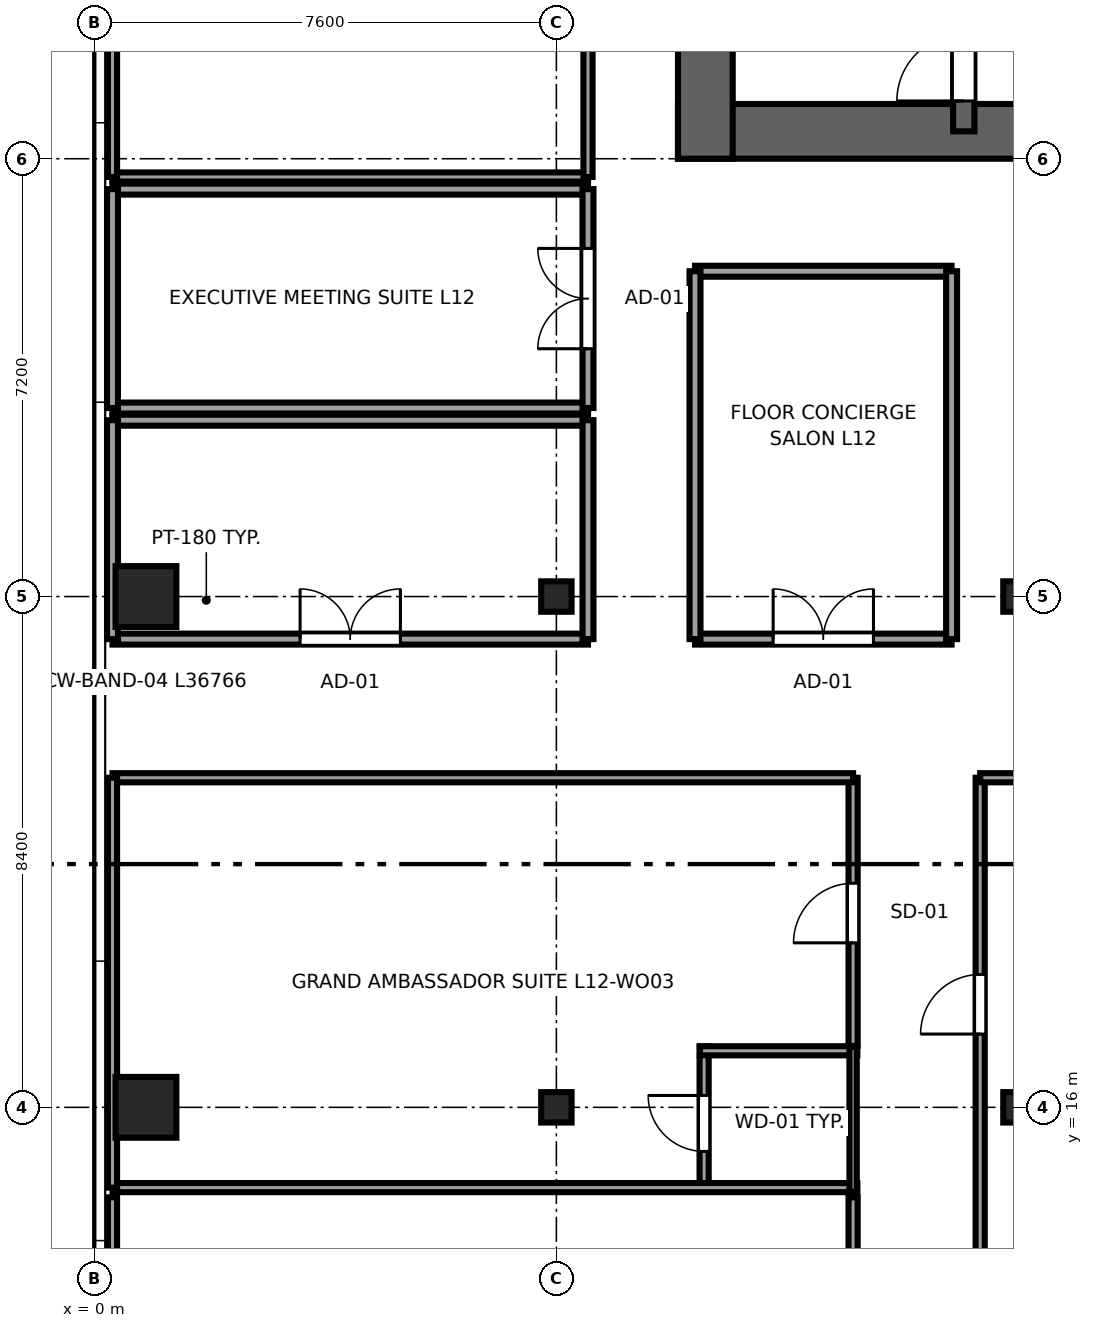
"""IFC4 building model, lengths in metres.
Left out: names, types, materials, properties, quantities, classifications, styles, units other than length and angle.
Written with IfcOpenShell. Run it as: python <this file> out.ifc"""

import sys

from ifc_helpers import new_model, si_unit, direction, frame, frame_2d, origin, origin_2d, place, context, subcontext, project, spatial, rectangle, i_section, extrude, source, transform, mapped, element, fill, save


model = new_model("IFC4")
c1 = context("Model", 3, precision=1e-05, world=origin(), true_north=direction((0.0, 1.0)))
c2 = subcontext(c1, "Body", "Model", "MODEL_VIEW")
j1 = project(units=[si_unit("LENGTHUNIT", "METRE"), si_unit("PLANEANGLEUNIT", "RADIAN")], contexts=[c1])
p1 = place(None, origin())
s1 = spatial("IfcSite", under=j1, at=p1, CompositionType="ELEMENT")
p2 = place(p1, origin())
s2 = spatial("IfcBuilding", under=s1, at=p2, CompositionType="ELEMENT")
p3 = place(p2, frame((0.0, 0.0, 53.3)))
s3 = spatial("IfcBuildingStorey", under=s2, at=p3, CompositionType="ELEMENT", Elevation=53.3)
p4 = place(p3, frame((9.6, 32.05, 0.0), z_axis=(0.0, 0.0, 1.0), x_axis=(1.0, 0.0, 0.0)))
e1 = element("IfcWall", 1, at=p4, inside=s3, PredefinedType="SHEAR", context=c2, shape_type="SweptSolid", body=[
    extrude(rectangle(XDim=26.8, YDim=0.9, at=frame_2d((13.4, 0.0))), origin(), (0.0, 0.0, 1.0), 3.55),
])
p5 = place(p4, frame((7.85, 0.0, 0.0), z_axis=(0.0, 0.0, 1.0), x_axis=(-1.0, 0.0, 0.0)))
e2 = element("IfcOpeningElement", 2, at=p5, cuts=e1, PredefinedType="OPENING", context=c2, shape_type="SweptSolid", body=[
    extrude(rectangle(XDim=1.5, YDim=2.04, at=frame_2d((0.75, 1.02))), frame((0.0, 0.46, 0.0), z_axis=(0.0, -1.0, 0.0), x_axis=(1.0, 0.0, 0.0)), (0.0, 0.0, 1.0), 0.92),
])
p6 = place(p4, frame((14.15, 0.0, 0.0), z_axis=(0.0, 0.0, 1.0), x_axis=(-1.0, 0.0, 0.0)))
e3 = element("IfcOpeningElement", 3, at=p6, cuts=e1, PredefinedType="OPENING", context=c2, shape_type="SweptSolid", body=[
    extrude(rectangle(XDim=1.5, YDim=2.04, at=frame_2d((0.75, 1.02))), frame((0.0, 0.46, 0.0), z_axis=(0.0, -1.0, 0.0), x_axis=(1.0, 0.0, 0.0)), (0.0, 0.0, 1.0), 0.92),
])
p7 = place(p4, frame((20.45, 0.0, 0.0), z_axis=(0.0, 0.0, 1.0), x_axis=(-1.0, 0.0, 0.0)))
e4 = element("IfcOpeningElement", 4, at=p7, cuts=e1, PredefinedType="OPENING", context=c2, shape_type="SweptSolid", body=[
    extrude(rectangle(XDim=1.5, YDim=2.04, at=frame_2d((0.75, 1.02))), frame((0.0, 0.46, 0.0), z_axis=(0.0, -1.0, 0.0), x_axis=(1.0, 0.0, 0.0)), (0.0, 0.0, 1.0), 0.92),
])
p8 = place(p3, frame((10.05, 31.6, 0.0), z_axis=(0.0, 0.0, 1.0), x_axis=(0.0, 1.0, 0.0)))
e5 = element("IfcWall", 5, at=p8, inside=s3, PredefinedType="SHEAR", context=c2, shape_type="SweptSolid", body=[
    extrude(rectangle(XDim=13.6, YDim=0.9, at=frame_2d((6.8, 0.0))), origin(), (0.0, 0.0, 1.0), 3.55),
])
p9 = place(p3, frame((14.3, 32.05, 0.0), z_axis=(0.0, 0.0, 1.0), x_axis=(0.0, 1.0, 0.0)))
e6 = element("IfcWall", 6, at=p9, inside=s3, PredefinedType="SHEAR", context=c2, shape_type="SweptSolid", body=[
    extrude(rectangle(XDim=12.7, YDim=0.35, at=frame_2d((6.35, 0.0))), origin(), (0.0, 0.0, 1.0), 3.55),
])
p10 = place(p9, frame((0.5, 0.0, 0.0)))
e7 = element("IfcOpeningElement", 7, at=p10, cuts=e6, PredefinedType="OPENING", context=c2, shape_type="SweptSolid", body=[
    extrude(rectangle(XDim=1.1, YDim=2.12, at=frame_2d((0.55, 1.06))), frame((0.0, 0.185, 0.0), z_axis=(0.0, -1.0, 0.0), x_axis=(1.0, 0.0, 0.0)), (0.0, 0.0, 1.0), 0.37),
])
m1 = source(origin(), c2, "Body", "SweptSolid", [
    extrude(rectangle(XDim=1.0, YDim=1.0, at=origin_2d()), origin(), (0.0, 0.0, 1.0), 3.55),
])
for number, where, z_axis, x_axis in (
    (8, (0.85, 16.0, 0.0), (0.0, 0.0, 1.0), (1.0, 0.0, 0.0)),
    (9, (0.85, 24.4, 0.0), (0.0, 0.0, 1.0), (1.0, 0.0, 0.0)),
):
    element("IfcColumn", number, at=place(p3, frame(where, z_axis=z_axis, x_axis=x_axis)), inside=s3, PredefinedType="COLUMN", context=c2, shape_type="MappedRepresentation", body=[
        mapped(m1, transform((0.0, 0.0, 0.0), x_axis=(1.0, 0.0, 0.0), y_axis=(0.0, 1.0, 0.0), z_axis=(0.0, 0.0, 1.0), scale=1.0)),
    ])
m2 = source(origin(), c2, "Body", "SweptSolid", [
    extrude(i_section(OverallWidth=0.5, OverallDepth=0.5, WebThickness=0.028, FlangeThickness=0.045, at=origin_2d()), origin(), (0.0, 0.0, 1.0), 3.55),
])
for number, where, z_axis, x_axis in (
    (10, (7.6, 16.0, 0.0), (0.0, 0.0, 1.0), (1.0, 0.0, 0.0)),
    (11, (7.6, 24.4, 0.0), (0.0, 0.0, 1.0), (1.0, 0.0, 0.0)),
    (12, (15.2, 16.0, 0.0), (0.0, 0.0, 1.0), (1.0, 0.0, 0.0)),
    (13, (15.2, 24.4, 0.0), (0.0, 0.0, 1.0), (1.0, 0.0, 0.0)),
):
    element("IfcColumn", number, at=place(p3, frame(where, z_axis=z_axis, x_axis=x_axis)), inside=s3, PredefinedType="COLUMN", context=c2, shape_type="MappedRepresentation", body=[
        mapped(m2, transform((0.0, 0.0, 0.0), x_axis=(1.0, 0.0, 0.0), y_axis=(0.0, 1.0, 0.0), z_axis=(0.0, 0.0, 1.0), scale=1.0)),
    ])
p11 = place(p3, frame((10.03, 14.61, 0.0), z_axis=(0.0, 0.0, 1.0), x_axis=(0.0, 1.0, 0.0)))
e14 = element("IfcWall", 14, at=p11, inside=s3, PredefinedType="PARTITIONING", context=c2, shape_type="SweptSolid", body=[
    extrude(rectangle(XDim=2.39, YDim=0.15, at=frame_2d((1.195, 0.0))), origin(), (0.0, 0.0, 1.0), 3.37),
])
p12 = place(p11, frame((0.665, 0.0, 0.0)))
e15 = element("IfcOpeningElement", 15, at=p12, cuts=e14, PredefinedType="OPENING", context=c2, shape_type="SweptSolid", body=[
    extrude(rectangle(XDim=0.92, YDim=2.01, at=frame_2d((0.46, 1.005))), frame((0.0, 0.085, 0.0), z_axis=(0.0, -1.0, 0.0), x_axis=(1.0, 0.0, 0.0)), (0.0, 0.0, 1.0), 0.17),
])
p13 = place(p3, frame((0.3, 14.68, 0.0), z_axis=(0.0, 0.0, 1.0), x_axis=(1.0, 0.0, 0.0)))
e16 = element("IfcWall", 16, at=p13, inside=s3, PredefinedType="PARTITIONING", context=c2, shape_type="SweptSolid", body=[
    extrude(rectangle(XDim=12.25, YDim=0.15, at=frame_2d((6.125, 0.0))), origin(), (0.0, 0.0, 1.0), 3.37),
])
p14 = place(p3, frame((9.96, 16.93, 0.0), z_axis=(0.0, 0.0, 1.0), x_axis=(1.0, 0.0, 0.0)))
e17 = element("IfcWall", 17, at=p14, inside=s3, PredefinedType="PARTITIONING", context=c2, shape_type="SweptSolid", body=[
    extrude(rectangle(XDim=2.59, YDim=0.15, at=frame_2d((1.295, 0.0))), origin(), (0.0, 0.0, 1.0), 3.37),
])
p15 = place(p3, frame((12.48, 14.61, 0.0), z_axis=(0.0, 0.0, 1.0), x_axis=(0.0, 1.0, 0.0)))
e18 = element("IfcWall", 18, at=p15, inside=s3, PredefinedType="PLUMBINGWALL", context=c2, shape_type="SweptSolid", body=[
    extrude(rectangle(XDim=2.39, YDim=0.12, at=frame_2d((1.195, 0.0))), origin(), (0.0, 0.0, 1.0), 3.37),
])
p16 = place(p3, frame((12.48, 10.01, 0.0), z_axis=(0.0, 0.0, 1.0), x_axis=(0.0, 1.0, 0.0)))
e19 = element("IfcWall", 19, at=p16, inside=s3, PredefinedType="PARTITIONING", context=c2, shape_type="SweptSolid", body=[
    extrude(rectangle(XDim=4.51, YDim=0.15, at=frame_2d((2.255, 0.0))), origin(), (0.0, 0.0, 1.0), 3.37),
])
p17 = place(p16, frame((1.745, 0.0, 0.0)))
e20 = element("IfcOpeningElement", 20, at=p17, cuts=e19, PredefinedType="OPENING", context=c2, shape_type="SweptSolid", body=[
    extrude(rectangle(XDim=0.98, YDim=2.12, at=frame_2d((0.49, 1.06))), frame((0.0, 0.085, 0.0), z_axis=(0.0, -1.0, 0.0), x_axis=(1.0, 0.0, 0.0)), (0.0, 0.0, 1.0), 0.17),
])
p18 = place(p3, frame((0.3, 7.68, 0.0), z_axis=(0.0, 0.0, 1.0), x_axis=(0.0, 1.0, 0.0)))
e21 = element("IfcWall", 21, at=p18, inside=s3, PredefinedType="PARTITIONING", context=c2, shape_type="SweptSolid", body=[
    extrude(rectangle(XDim=6.84, YDim=0.15, at=frame_2d((3.42, 0.0))), origin(), (0.0, 0.0, 1.0), 3.37),
])
p19 = place(p3, frame((12.48, 17.01, 0.0), z_axis=(0.0, 0.0, 1.0), x_axis=(0.0, 1.0, 0.0)))
e22 = element("IfcWall", 22, at=p19, inside=s3, PredefinedType="PARTITIONING", context=c2, shape_type="SweptSolid", body=[
    extrude(rectangle(XDim=4.41, YDim=0.15, at=frame_2d((2.205, 0.0))), origin(), (0.0, 0.0, 1.0), 3.37),
])
p20 = place(p19, frame((1.695, 0.0, 0.0)))
e23 = element("IfcOpeningElement", 23, at=p20, cuts=e22, PredefinedType="OPENING", context=c2, shape_type="SweptSolid", body=[
    extrude(rectangle(XDim=0.98, YDim=2.12, at=frame_2d((0.49, 1.06))), frame((0.0, 0.085, 0.0), z_axis=(0.0, -1.0, 0.0), x_axis=(1.0, 0.0, 0.0)), (0.0, 0.0, 1.0), 0.17),
])
p21 = place(p3, frame((0.3, 21.42, 0.0), z_axis=(0.0, 0.0, 1.0), x_axis=(1.0, 0.0, 0.0)))
e24 = element("IfcWall", 24, at=p21, inside=s3, PredefinedType="PARTITIONING", context=c2, shape_type="SweptSolid", body=[
    extrude(rectangle(XDim=12.18, YDim=0.15, at=frame_2d((6.09, 0.0))), origin(), (0.0, 0.0, 1.0), 3.37),
])
p22 = place(p3, frame((0.3, 14.68, 0.0), z_axis=(0.0, 0.0, 1.0), x_axis=(0.0, 1.0, 0.0)))
e25 = element("IfcWall", 25, at=p22, inside=s3, PredefinedType="PARTITIONING", context=c2, shape_type="SweptSolid", body=[
    extrude(rectangle(XDim=6.74, YDim=0.15, at=frame_2d((3.37, 0.0))), origin(), (0.0, 0.0, 1.0), 3.37),
])
p23 = place(p3, frame((14.57, 13.41, 0.0), z_axis=(0.0, 0.0, 1.0), x_axis=(0.0, 1.0, 0.0)))
e26 = element("IfcWall", 26, at=p23, inside=s3, PredefinedType="PARTITIONING", context=c2, shape_type="SweptSolid", body=[
    extrude(rectangle(XDim=8.01, YDim=0.15, at=frame_2d((4.005, 0.0))), origin(), (0.0, 0.0, 1.0), 3.37),
])
p24 = place(p23, frame((3.795, 0.0, 0.0)))
e27 = element("IfcOpeningElement", 27, at=p24, cuts=e26, PredefinedType="OPENING", context=c2, shape_type="SweptSolid", body=[
    extrude(rectangle(XDim=0.98, YDim=2.12, at=frame_2d((0.49, 1.06))), frame((0.0, 0.085, 0.0), z_axis=(0.0, -1.0, 0.0), x_axis=(1.0, 0.0, 0.0)), (0.0, 0.0, 1.0), 0.17),
])
p25 = place(p3, frame((14.57, 21.42, 0.0), z_axis=(0.0, 0.0, 1.0), x_axis=(1.0, 0.0, 0.0)))
e28 = element("IfcWall", 28, at=p25, inside=s3, PredefinedType="PARTITIONING", context=c2, shape_type="SweptSolid", body=[
    extrude(rectangle(XDim=7.78, YDim=0.15, at=frame_2d((3.89, 0.0))), origin(), (0.0, 0.0, 1.0), 3.37),
])
p26 = place(p3, frame((0.3, 23.7, 0.0), z_axis=(0.0, 0.0, 1.0), x_axis=(1.0, 0.0, 0.0)))
e29 = element("IfcWall", 29, at=p26, inside=s3, PredefinedType="PARTITIONING", context=c2, shape_type="SweptSolid", body=[
    extrude(rectangle(XDim=7.82, YDim=0.18, at=frame_2d((3.91, 0.0))), origin(), (0.0, 0.0, 1.0), 3.37),
])
p27 = place(p26, frame((3.085, 0.0, 0.0)))
e30 = element("IfcOpeningElement", 30, at=p27, cuts=e29, PredefinedType="OPENING", context=c2, shape_type="SweptSolid", body=[
    extrude(rectangle(XDim=1.65, YDim=2.15, at=frame_2d((0.825, 1.075))), frame((0.0, 0.1, 0.0), z_axis=(0.0, -1.0, 0.0), x_axis=(1.0, 0.0, 0.0)), (0.0, 0.0, 1.0), 0.2),
])
p28 = place(p3, frame((0.3, 27.3, 0.0), z_axis=(0.0, 0.0, 1.0), x_axis=(1.0, 0.0, 0.0)))
e31 = element("IfcWall", 31, at=p28, inside=s3, PredefinedType="PARTITIONING", context=c2, shape_type="SweptSolid", body=[
    extrude(rectangle(XDim=7.82, YDim=0.18, at=frame_2d((3.91, 0.0))), origin(), (0.0, 0.0, 1.0), 3.37),
])
for number, where, z_axis, x_axis in (
    (32, (0.3, 23.7, 0.0), (0.0, 0.0, 1.0), (0.0, 1.0, 0.0)),
    (33, (8.12, 23.7, 0.0), (0.0, 0.0, 1.0), (0.0, 1.0, 0.0)),
):
    element("IfcWall", number, at=place(p3, frame(where, z_axis=z_axis, x_axis=x_axis)), inside=s3, PredefinedType="PARTITIONING", context=c2, shape_type="SweptSolid", body=[
        extrude(rectangle(XDim=3.6, YDim=0.18, at=frame_2d((1.8, 0.0))), origin(), (0.0, 0.0, 1.0), 3.37),
    ])
for number, where, z_axis, x_axis in (
    (34, (0.3, 27.5, 0.0), (0.0, 0.0, 1.0), (1.0, 0.0, 0.0)),
    (35, (0.3, 31.1, 0.0), (0.0, 0.0, 1.0), (1.0, 0.0, 0.0)),
):
    element("IfcWall", number, at=place(p3, frame(where, z_axis=z_axis, x_axis=x_axis)), inside=s3, PredefinedType="PARTITIONING", context=c2, shape_type="SweptSolid", body=[
        extrude(rectangle(XDim=7.82, YDim=0.18, at=frame_2d((3.91, 0.0))), origin(), (0.0, 0.0, 1.0), 3.37),
    ])
p29 = place(p3, frame((0.3, 27.5, 0.0), z_axis=(0.0, 0.0, 1.0), x_axis=(0.0, 1.0, 0.0)))
e36 = element("IfcWall", 36, at=p29, inside=s3, PredefinedType="PARTITIONING", context=c2, shape_type="SweptSolid", body=[
    extrude(rectangle(XDim=3.6, YDim=0.18, at=frame_2d((1.8, 0.0))), origin(), (0.0, 0.0, 1.0), 3.37),
])
p30 = place(p3, frame((8.12, 27.5, 0.0), z_axis=(0.0, 0.0, 1.0), x_axis=(0.0, 1.0, 0.0)))
e37 = element("IfcWall", 37, at=p30, inside=s3, PredefinedType="PARTITIONING", context=c2, shape_type="SweptSolid", body=[
    extrude(rectangle(XDim=3.6, YDim=0.18, at=frame_2d((1.8, 0.0))), origin(), (0.0, 0.0, 1.0), 3.37),
])
p31 = place(p30, frame((0.975, 0.0, 0.0)))
e38 = element("IfcOpeningElement", 38, at=p31, cuts=e37, PredefinedType="OPENING", context=c2, shape_type="SweptSolid", body=[
    extrude(rectangle(XDim=1.65, YDim=2.15, at=frame_2d((0.825, 1.075))), frame((0.0, 0.1, 0.0), z_axis=(0.0, -1.0, 0.0), x_axis=(1.0, 0.0, 0.0)), (0.0, 0.0, 1.0), 0.2),
])
p32 = place(p3, frame((0.3, 31.3, 0.0), z_axis=(0.0, 0.0, 1.0), x_axis=(1.0, 0.0, 0.0)))
e39 = element("IfcWall", 39, at=p32, inside=s3, PredefinedType="PARTITIONING", context=c2, shape_type="SweptSolid", body=[
    extrude(rectangle(XDim=7.82, YDim=0.15, at=frame_2d((3.91, 0.0))), origin(), (0.0, 0.0, 1.0), 3.37),
])
p33 = place(p3, frame((0.3, 31.3, 0.0), z_axis=(0.0, 0.0, 1.0), x_axis=(0.0, 1.0, 0.0)))
e40 = element("IfcWall", 40, at=p33, inside=s3, PredefinedType="PARTITIONING", context=c2, shape_type="SweptSolid", body=[
    extrude(rectangle(XDim=10.058, YDim=0.15, at=frame_2d((5.029, 0.0))), origin(), (0.0, 0.0, 1.0), 3.37),
])
p34 = place(p3, frame((8.12, 31.3, 0.0), z_axis=(0.0, 0.0, 1.0), x_axis=(0.0, 1.0, 0.0)))
e41 = element("IfcWall", 41, at=p34, inside=s3, PredefinedType="PARTITIONING", context=c2, shape_type="SweptSolid", body=[
    extrude(rectangle(XDim=14.295, YDim=0.15, at=frame_2d((7.147, 0.0))), origin(), (0.0, 0.0, 1.0), 3.37),
])
p35 = place(p34, frame((6.323, 0.0, 0.0)))
e42 = element("IfcOpeningElement", 42, at=p35, cuts=e41, PredefinedType="OPENING", context=c2, shape_type="SweptSolid", body=[
    extrude(rectangle(XDim=1.65, YDim=2.15, at=frame_2d((0.825, 1.075))), frame((0.0, 0.085, 0.0), z_axis=(0.0, -1.0, 0.0), x_axis=(1.0, 0.0, 0.0)), (0.0, 0.0, 1.0), 0.17),
])
p36 = place(p3, frame((9.88, 23.7, 0.0), z_axis=(0.0, 0.0, 1.0), x_axis=(1.0, 0.0, 0.0)))
e43 = element("IfcWall", 43, at=p36, inside=s3, PredefinedType="PARTITIONING", context=c2, shape_type="SweptSolid", body=[
    extrude(rectangle(XDim=4.22, YDim=0.18, at=frame_2d((2.11, 0.0))), origin(), (0.0, 0.0, 1.0), 3.37),
])
p37 = place(p36, frame((1.285, 0.0, 0.0)))
e44 = element("IfcOpeningElement", 44, at=p37, cuts=e43, PredefinedType="OPENING", context=c2, shape_type="SweptSolid", body=[
    extrude(rectangle(XDim=1.65, YDim=2.15, at=frame_2d((0.825, 1.075))), frame((0.0, 0.1, 0.0), z_axis=(0.0, -1.0, 0.0), x_axis=(1.0, 0.0, 0.0)), (0.0, 0.0, 1.0), 0.2),
])
p38 = place(p3, frame((9.88, 29.75, 0.0), z_axis=(0.0, 0.0, 1.0), x_axis=(1.0, 0.0, 0.0)))
e45 = element("IfcWall", 45, at=p38, inside=s3, PredefinedType="PARTITIONING", context=c2, shape_type="SweptSolid", body=[
    extrude(rectangle(XDim=4.22, YDim=0.18, at=frame_2d((2.11, 0.0))), origin(), (0.0, 0.0, 1.0), 3.37),
])
for number, where, z_axis, x_axis in (
    (46, (9.88, 23.7, 0.0), (0.0, 0.0, 1.0), (0.0, 1.0, 0.0)),
    (47, (14.1, 23.7, 0.0), (0.0, 0.0, 1.0), (0.0, 1.0, 0.0)),
):
    element("IfcWall", number, at=place(p3, frame(where, z_axis=z_axis, x_axis=x_axis)), inside=s3, PredefinedType="PARTITIONING", context=c2, shape_type="SweptSolid", body=[
        extrude(rectangle(XDim=6.05, YDim=0.18, at=frame_2d((3.025, 0.0))), origin(), (0.0, 0.0, 1.0), 3.37),
    ])
m3 = source(origin(), c2, "Body", "SweptSolid", [
    extrude(rectangle(XDim=1.1, YDim=2.12, at=frame_2d((0.55, 1.06))), frame((0.0, 0.025, 0.0), z_axis=(0.0, -1.0, 0.0), x_axis=(1.0, 0.0, 0.0)), (0.0, 0.0, 1.0), 0.05),
])
p39 = place(p10, origin())
e48 = element("IfcDoor", 48, at=p39, inside=s3, OperationType="SINGLE_SWING_LEFT", PredefinedType="DOOR", context=c2, shape_type="MappedRepresentation", body=[
    mapped(m3, transform((0.0, 0.0, 0.0), x_axis=(1.0, 0.0, 0.0), y_axis=(0.0, 1.0, 0.0), z_axis=(0.0, 0.0, 1.0), scale=1.0)),
])
fill(e7, e48)
m4 = source(origin(), c2, "Body", "SweptSolid", [
    extrude(rectangle(XDim=0.92, YDim=2.01, at=frame_2d((0.46, 1.005))), frame((0.0, 0.025, 0.0), z_axis=(0.0, -1.0, 0.0), x_axis=(1.0, 0.0, 0.0)), (0.0, 0.0, 1.0), 0.05),
])
p40 = place(p12, origin())
e49 = element("IfcDoor", 49, at=p40, inside=s3, OperationType="SINGLE_SWING_RIGHT", PredefinedType="DOOR", context=c2, shape_type="MappedRepresentation", body=[
    mapped(m4, transform((0.0, 0.0, 0.0), x_axis=(1.0, 0.0, 0.0), y_axis=(0.0, 1.0, 0.0), z_axis=(0.0, 0.0, 1.0), scale=1.0)),
])
fill(e15, e49)
m5 = source(origin(), c2, "Body", "SweptSolid", [
    extrude(rectangle(XDim=0.98, YDim=2.12, at=frame_2d((0.49, 1.06))), frame((0.0, 0.025, 0.0), z_axis=(0.0, -1.0, 0.0), x_axis=(1.0, 0.0, 0.0)), (0.0, 0.0, 1.0), 0.05),
])
p41 = place(p20, origin())
e50 = element("IfcDoor", 50, at=p41, inside=s3, OperationType="SINGLE_SWING_LEFT", PredefinedType="DOOR", context=c2, shape_type="MappedRepresentation", body=[
    mapped(m5, transform((0.0, 0.0, 0.0), x_axis=(1.0, 0.0, 0.0), y_axis=(0.0, 1.0, 0.0), z_axis=(0.0, 0.0, 1.0), scale=1.0)),
])
fill(e23, e50)
p42 = place(p24, origin())
e51 = element("IfcDoor", 51, at=p42, inside=s3, OperationType="SINGLE_SWING_LEFT", PredefinedType="DOOR", context=c2, shape_type="MappedRepresentation", body=[
    mapped(m5, transform((0.0, 0.0, 0.0), x_axis=(1.0, 0.0, 0.0), y_axis=(0.0, 1.0, 0.0), z_axis=(0.0, 0.0, 1.0), scale=1.0)),
])
fill(e27, e51)
m6 = source(origin(), c2, "Body", "SweptSolid", [
    extrude(rectangle(XDim=1.65, YDim=2.15, at=frame_2d((0.825, 1.075))), frame((0.0, 0.025, 0.0), z_axis=(0.0, -1.0, 0.0), x_axis=(1.0, 0.0, 0.0)), (0.0, 0.0, 1.0), 0.05),
])
p43 = place(p27, origin())
e52 = element("IfcDoor", 52, at=p43, inside=s3, OperationType="DOUBLE_DOOR_SINGLE_SWING", PredefinedType="DOOR", context=c2, shape_type="MappedRepresentation", body=[
    mapped(m6, transform((0.0, 0.0, 0.0), x_axis=(1.0, 0.0, 0.0), y_axis=(0.0, 1.0, 0.0), z_axis=(0.0, 0.0, 1.0), scale=1.0)),
])
fill(e30, e52)
p44 = place(p31, origin())
e53 = element("IfcDoor", 53, at=p44, inside=s3, OperationType="DOUBLE_DOOR_SINGLE_SWING", PredefinedType="DOOR", context=c2, shape_type="MappedRepresentation", body=[
    mapped(m6, transform((0.0, 0.0, 0.0), x_axis=(1.0, 0.0, 0.0), y_axis=(0.0, 1.0, 0.0), z_axis=(0.0, 0.0, 1.0), scale=1.0)),
])
fill(e38, e53)
p45 = place(p37, origin())
e54 = element("IfcDoor", 54, at=p45, inside=s3, OperationType="DOUBLE_DOOR_SINGLE_SWING", PredefinedType="DOOR", context=c2, shape_type="MappedRepresentation", body=[
    mapped(m6, transform((0.0, 0.0, 0.0), x_axis=(1.0, 0.0, 0.0), y_axis=(0.0, 1.0, 0.0), z_axis=(0.0, 0.0, 1.0), scale=1.0)),
])
fill(e44, e54)
save(model, sys.argv[1])
